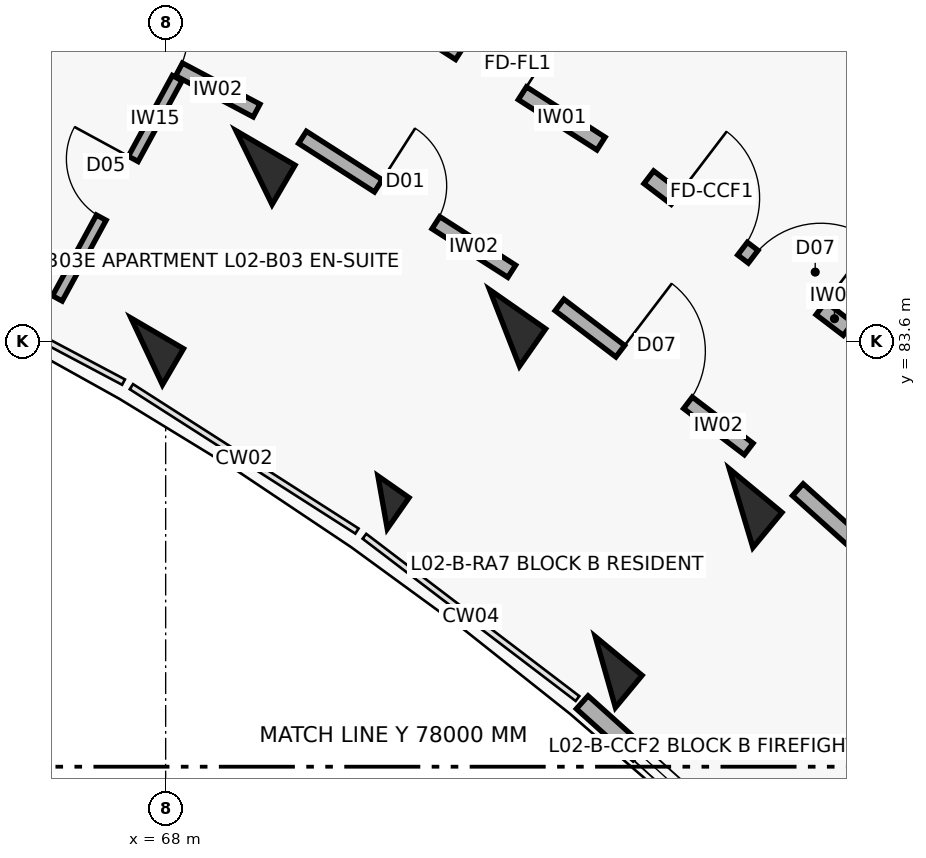
"""IFC4 building model, lengths in metres.
Left out: names, types, materials, properties, quantities, classifications, styles, units other than length and angle.
Written with IfcOpenShell. Run it as: python <this file> out.ifc"""

import sys

from ifc_helpers import new_model, si_unit, direction, frame, frame_2d, origin, origin_2d, place, context, subcontext, project, spatial, rectangle, extrude, element, fill, save


model = new_model("IFC4")
c1 = context("Model", 3, precision=1e-05, world=origin(), true_north=direction((0.0, 1.0)))
c2 = subcontext(c1, "Body", "Model", "MODEL_VIEW")
j1 = project(units=[si_unit("LENGTHUNIT", "METRE"), si_unit("PLANEANGLEUNIT", "RADIAN")], contexts=[c1])
p1 = place(None, origin())
s1 = spatial("IfcSite", under=j1, at=p1, CompositionType="ELEMENT")
p2 = place(p1, origin())
s2 = spatial("IfcBuilding", under=s1, at=p2, CompositionType="ELEMENT")
p3 = place(p2, frame((0.0, 0.0, 8.1)))
s3 = spatial("IfcBuildingStorey", under=s2, at=p3, CompositionType="ELEMENT", Elevation=8.1)
p4 = place(p3, frame((67.751, 83.464, 0.0), z_axis=(0.0, 0.0, 1.0), x_axis=(0.504226211181, 0.863571611366, 0.0)))
e1 = element("IfcColumn", 1, at=p4, inside=s3, PredefinedType="COLUMN", context=c2, shape_type="SweptSolid", body=[
    extrude(rectangle(XDim=0.55, YDim=0.8, at=origin_2d()), origin(), (0.0, 0.0, 1.0), 3.1),
])
p5 = place(p3, frame((69.163, 85.882, 0.0), z_axis=(0.0, 0.0, 1.0), x_axis=(0.504226211181, 0.863571611366, 0.0)))
e2 = element("IfcColumn", 2, at=p5, inside=s3, PredefinedType="COLUMN", context=c2, shape_type="SweptSolid", body=[
    extrude(rectangle(XDim=0.6, YDim=0.9, at=origin_2d()), origin(), (0.0, 0.0, 1.0), 3.1),
])
p6 = place(p3, frame((70.854, 81.478, 0.0), z_axis=(0.0, 0.0, 1.0), x_axis=(0.573004420611, 0.819552276527, 0.0)))
e3 = element("IfcColumn", 3, at=p6, inside=s3, PredefinedType="COLUMN", context=c2, shape_type="SweptSolid", body=[
    extrude(rectangle(XDim=0.5, YDim=0.5, at=origin_2d()), origin(), (0.0, 0.0, 1.0), 3.1),
])
p7 = place(p3, frame((72.458, 83.773, 0.0), z_axis=(0.0, 0.0, 1.0), x_axis=(0.573004420611, 0.819552276527, 0.0)))
e4 = element("IfcColumn", 4, at=p7, inside=s3, PredefinedType="COLUMN", context=c2, shape_type="SweptSolid", body=[
    extrude(rectangle(XDim=0.6, YDim=0.9, at=origin_2d()), origin(), (0.0, 0.0, 1.0), 3.1),
])
p8 = place(p3, frame((73.785, 79.245, 0.0), z_axis=(0.0, 0.0, 1.0), x_axis=(0.637961754089, 0.770068049148, 0.0)))
e5 = element("IfcColumn", 5, at=p8, inside=s3, PredefinedType="COLUMN", context=c2, shape_type="SweptSolid", body=[
    extrude(rectangle(XDim=0.55, YDim=0.8, at=origin_2d()), origin(), (0.0, 0.0, 1.0), 3.1),
])
p9 = place(p3, frame((75.571, 81.402, 0.0), z_axis=(0.0, 0.0, 1.0), x_axis=(0.637961754089, 0.770068049148, 0.0)))
e6 = element("IfcColumn", 6, at=p9, inside=s3, PredefinedType="COLUMN", context=c2, shape_type="SweptSolid", body=[
    extrude(rectangle(XDim=0.6, YDim=0.9, at=origin_2d()), origin(), (0.0, 0.0, 1.0), 3.1),
])
p10 = place(p3, frame((73.481, 78.847, 0.0), z_axis=(0.0, 0.0, 1.0), x_axis=(0.743385092197, -0.668863666751, 0.0)))
e7 = element("IfcWall", 7, at=p10, inside=s3, PredefinedType="SOLIDWALL", context=c2, shape_type="SweptSolid", body=[
    extrude(rectangle(XDim=3.604, YDim=0.23, at=frame_2d((1.802, 0.0))), origin(), (0.0, 0.0, 1.0), 2.25),
])
p11 = place(p10, frame((1.002, 0.0, 0.32)))
e8 = element("IfcOpeningElement", 8, at=p11, cuts=e7, PredefinedType="OPENING", context=c2, shape_type="SweptSolid", body=[
    extrude(rectangle(XDim=1.6, YDim=1.5, at=frame_2d((0.8, 0.75))), frame((0.0, 0.125, 0.0), z_axis=(0.0, -1.0, 0.0), x_axis=(1.0, 0.0, 0.0)), (0.0, 0.0, 1.0), 0.25),
])
p12 = place(p3, frame((66.309, 88.165, 0.0), z_axis=(0.0, 0.0, 1.0), x_axis=(0.883444301944, -0.468536194293, 0.0)))
e9 = element("IfcWall", 9, at=p12, inside=s3, PredefinedType="SOLIDWALL", context=c2, shape_type="SweptSolid", body=[
    extrude(rectangle(XDim=3.269, YDim=0.19, at=frame_2d((1.634, 0.0))), origin(), (0.0, 0.0, 1.0), 2.08),
])
p13 = place(p12, frame((1.154, 0.0, 0.0)))
e10 = element("IfcOpeningElement", 10, at=p13, cuts=e9, PredefinedType="OPENING", context=c2, shape_type="SweptSolid", body=[
    extrude(rectangle(XDim=0.96, YDim=2.1, at=frame_2d((0.48, 1.05))), frame((0.0, 0.105, 0.0), z_axis=(0.0, -1.0, 0.0), x_axis=(1.0, 0.0, 0.0)), (0.0, 0.0, 1.0), 0.21),
])
p14 = place(p3, frame((66.575, 84.162, 0.0), z_axis=(0.0, 0.0, 1.0), x_axis=(0.477841058477, 0.878446311868, 0.0)))
e11 = element("IfcWall", 11, at=p14, inside=s3, PredefinedType="PARTITIONING", context=c2, shape_type="SweptSolid", body=[
    extrude(rectangle(XDim=3.3, YDim=0.145, at=frame_2d((1.65, 0.0))), origin(), (0.0, 0.0, 1.0), 2.08),
])
p15 = place(p14, frame((1.21, 0.0, 0.0)))
e12 = element("IfcOpeningElement", 12, at=p15, cuts=e11, PredefinedType="OPENING", context=c2, shape_type="SweptSolid", body=[
    extrude(rectangle(XDim=0.88, YDim=2.1, at=frame_2d((0.44, 1.05))), frame((0.0, 0.083, 0.0), z_axis=(0.0, -1.0, 0.0), x_axis=(1.0, 0.0, 0.0)), (0.0, 0.0, 1.0), 0.165),
])
p16 = place(p3, frame((70.834, 88.051, 0.0), z_axis=(0.0, 0.0, 1.0), x_axis=(0.842257205985, -0.539075874963, 0.0)))
e13 = element("IfcWall", 13, at=p16, inside=s3, PredefinedType="SOLIDWALL", context=c2, shape_type="SweptSolid", body=[
    extrude(rectangle(XDim=3.436, YDim=0.2, at=frame_2d((1.718, 0.0))), origin(), (0.0, 0.0, 1.0), 2.08),
])
p17 = place(p16, frame((1.228, 0.0, 0.0)))
e14 = element("IfcOpeningElement", 14, at=p17, cuts=e13, PredefinedType="OPENING", context=c2, shape_type="SweptSolid", body=[
    extrude(rectangle(XDim=0.98, YDim=2.15, at=frame_2d((0.49, 1.075))), frame((0.0, 0.11, 0.0), z_axis=(0.0, -1.0, 0.0), x_axis=(1.0, 0.0, 0.0)), (0.0, 0.0, 1.0), 0.22),
])
p18 = place(p3, frame((69.8, 86.281, 0.0), z_axis=(0.0, 0.0, 1.0), x_axis=(0.842225276846, -0.539125758095, 0.0)))
e15 = element("IfcWall", 15, at=p18, inside=s3, PredefinedType="SOLIDWALL", context=c2, shape_type="SweptSolid", body=[
    extrude(rectangle(XDim=3.269, YDim=0.19, at=frame_2d((1.634, 0.0))), origin(), (0.0, 0.0, 1.0), 2.08),
])
p19 = place(p18, frame((1.184, 0.0, 0.0)))
e16 = element("IfcOpeningElement", 16, at=p19, cuts=e15, PredefinedType="OPENING", context=c2, shape_type="SweptSolid", body=[
    extrude(rectangle(XDim=0.9, YDim=2.1, at=frame_2d((0.45, 1.05))), frame((0.0, 0.105, 0.0), z_axis=(0.0, -1.0, 0.0), x_axis=(1.0, 0.0, 0.0)), (0.0, 0.0, 1.0), 0.21),
])
p20 = place(p3, frame((74.357, 85.756, 0.0), z_axis=(0.0, 0.0, 1.0), x_axis=(0.795498026433, -0.605956178235, 0.0)))
e17 = element("IfcWall", 17, at=p20, inside=s3, PredefinedType="SOLIDWALL", context=c2, shape_type="SweptSolid", body=[
    extrude(rectangle(XDim=3.296, YDim=0.21, at=frame_2d((1.648, 0.0))), origin(), (0.0, 0.0, 1.0), 2.08),
])
p21 = place(p20, frame((0.45, 0.0, 0.0)))
e18 = element("IfcOpeningElement", 18, at=p21, cuts=e17, PredefinedType="OPENING", context=c2, shape_type="SweptSolid", body=[
    extrude(rectangle(XDim=1.1, YDim=2.15, at=frame_2d((0.55, 1.075))), frame((0.0, 0.115, 0.0), z_axis=(0.0, -1.0, 0.0), x_axis=(1.0, 0.0, 0.0)), (0.0, 0.0, 1.0), 0.23),
])
p22 = place(p20, frame((1.726, 0.0, 0.0)))
e19 = element("IfcOpeningElement", 19, at=p22, cuts=e17, PredefinedType="OPENING", context=c2, shape_type="SweptSolid", body=[
    extrude(rectangle(XDim=1.12, YDim=2.15, at=frame_2d((0.56, 1.075))), frame((0.0, 0.115, 0.0), z_axis=(0.0, -1.0, 0.0), x_axis=(1.0, 0.0, 0.0)), (0.0, 0.0, 1.0), 0.23),
])
p23 = place(p3, frame((73.182, 84.076, 0.0), z_axis=(0.0, 0.0, 1.0), x_axis=(0.795501577908, -0.605951515838, 0.0)))
e20 = element("IfcWall", 20, at=p23, inside=s3, PredefinedType="SOLIDWALL", context=c2, shape_type="SweptSolid", body=[
    extrude(rectangle(XDim=3.129, YDim=0.19, at=frame_2d((1.564, 0.0))), origin(), (0.0, 0.0, 1.0), 2.08),
])
p24 = place(p23, frame((1.004, 0.0, 0.0)))
e21 = element("IfcOpeningElement", 21, at=p24, cuts=e20, PredefinedType="OPENING", context=c2, shape_type="SweptSolid", body=[
    extrude(rectangle(XDim=1.12, YDim=2.15, at=frame_2d((0.56, 1.075))), frame((0.0, 0.105, 0.0), z_axis=(0.0, -1.0, 0.0), x_axis=(1.0, 0.0, 0.0)), (0.0, 0.0, 1.0), 0.21),
])
p25 = place(p3, frame((76.317, 81.644, 0.0), z_axis=(0.0, 0.0, 1.0), x_axis=(0.743387266925, -0.668861249718, 0.0)))
e22 = element("IfcWall", 22, at=p25, inside=s3, PredefinedType="SOLIDWALL", context=c2, shape_type="SweptSolid", body=[
    extrude(rectangle(XDim=3.128, YDim=0.21, at=frame_2d((1.564, 0.0))), origin(), (0.0, 0.0, 1.0), 2.08),
])
p26 = place(p25, frame((1.014, 0.0, 0.0)))
e23 = element("IfcOpeningElement", 23, at=p26, cuts=e22, PredefinedType="OPENING", context=c2, shape_type="SweptSolid", body=[
    extrude(rectangle(XDim=1.1, YDim=2.15, at=frame_2d((0.55, 1.075))), frame((0.0, 0.115, 0.0), z_axis=(0.0, -1.0, 0.0), x_axis=(1.0, 0.0, 0.0)), (0.0, 0.0, 1.0), 0.23),
])
p27 = place(p11, origin())
e24 = element("IfcWindow", 24, at=p27, inside=s3, PartitioningType="DOUBLE_PANEL_VERTICAL", PredefinedType="WINDOW", context=c2, shape_type="SweptSolid", body=[
    extrude(rectangle(XDim=1.6, YDim=1.5, at=frame_2d((0.8, 0.75))), frame((0.0, 0.03, 0.0), z_axis=(0.0, -1.0, 0.0), x_axis=(1.0, 0.0, 0.0)), (0.0, 0.0, 1.0), 0.06),
])
fill(e8, e24)
p28 = place(p13, origin())
e25 = element("IfcDoor", 25, at=p28, inside=s3, OperationType="SINGLE_SWING_LEFT", PredefinedType="DOOR", context=c2, shape_type="SweptSolid", body=[
    extrude(rectangle(XDim=0.96, YDim=2.1, at=frame_2d((0.48, 1.05))), frame((0.0, 0.025, 0.0), z_axis=(0.0, -1.0, 0.0), x_axis=(1.0, 0.0, 0.0)), (0.0, 0.0, 1.0), 0.05),
])
fill(e10, e25)
p29 = place(p15, origin())
e26 = element("IfcDoor", 26, at=p29, inside=s3, OperationType="SINGLE_SWING_RIGHT", PredefinedType="DOOR", context=c2, shape_type="SweptSolid", body=[
    extrude(rectangle(XDim=0.88, YDim=2.1, at=frame_2d((0.44, 1.05))), frame((0.0, 0.025, 0.0), z_axis=(0.0, -1.0, 0.0), x_axis=(1.0, 0.0, 0.0)), (0.0, 0.0, 1.0), 0.05),
])
fill(e12, e26)
p30 = place(p17, origin())
e27 = element("IfcDoor", 27, at=p30, inside=s3, OperationType="SINGLE_SWING_RIGHT", PredefinedType="DOOR", context=c2, shape_type="SweptSolid", body=[
    extrude(rectangle(XDim=0.98, YDim=2.15, at=frame_2d((0.49, 1.075))), frame((0.0, 0.025, 0.0), z_axis=(0.0, -1.0, 0.0), x_axis=(1.0, 0.0, 0.0)), (0.0, 0.0, 1.0), 0.05),
])
fill(e14, e27)
p31 = place(p19, origin())
e28 = element("IfcDoor", 28, at=p31, inside=s3, OperationType="SINGLE_SWING_LEFT", PredefinedType="DOOR", context=c2, shape_type="SweptSolid", body=[
    extrude(rectangle(XDim=0.9, YDim=2.1, at=frame_2d((0.45, 1.05))), frame((0.0, 0.025, 0.0), z_axis=(0.0, -1.0, 0.0), x_axis=(1.0, 0.0, 0.0)), (0.0, 0.0, 1.0), 0.05),
])
fill(e16, e28)
p32 = place(p21, origin())
e29 = element("IfcDoor", 29, at=p32, inside=s3, OperationType="SINGLE_SWING_LEFT", PredefinedType="DOOR", context=c2, shape_type="SweptSolid", body=[
    extrude(rectangle(XDim=1.1, YDim=2.15, at=frame_2d((0.55, 1.075))), frame((0.0, 0.025, 0.0), z_axis=(0.0, -1.0, 0.0), x_axis=(1.0, 0.0, 0.0)), (0.0, 0.0, 1.0), 0.05),
])
fill(e18, e29)
p33 = place(p22, origin())
e30 = element("IfcDoor", 30, at=p33, inside=s3, OperationType="SINGLE_SWING_RIGHT", PredefinedType="DOOR", context=c2, shape_type="SweptSolid", body=[
    extrude(rectangle(XDim=1.12, YDim=2.15, at=frame_2d((0.56, 1.075))), frame((0.0, 0.025, 0.0), z_axis=(0.0, -1.0, 0.0), x_axis=(1.0, 0.0, 0.0)), (0.0, 0.0, 1.0), 0.05),
])
fill(e19, e30)
p34 = place(p24, origin())
e31 = element("IfcDoor", 31, at=p34, inside=s3, OperationType="SINGLE_SWING_LEFT", PredefinedType="DOOR", context=c2, shape_type="SweptSolid", body=[
    extrude(rectangle(XDim=1.12, YDim=2.15, at=frame_2d((0.56, 1.075))), frame((0.0, 0.025, 0.0), z_axis=(0.0, -1.0, 0.0), x_axis=(1.0, 0.0, 0.0)), (0.0, 0.0, 1.0), 0.05),
])
fill(e21, e31)
save(model, sys.argv[1])
